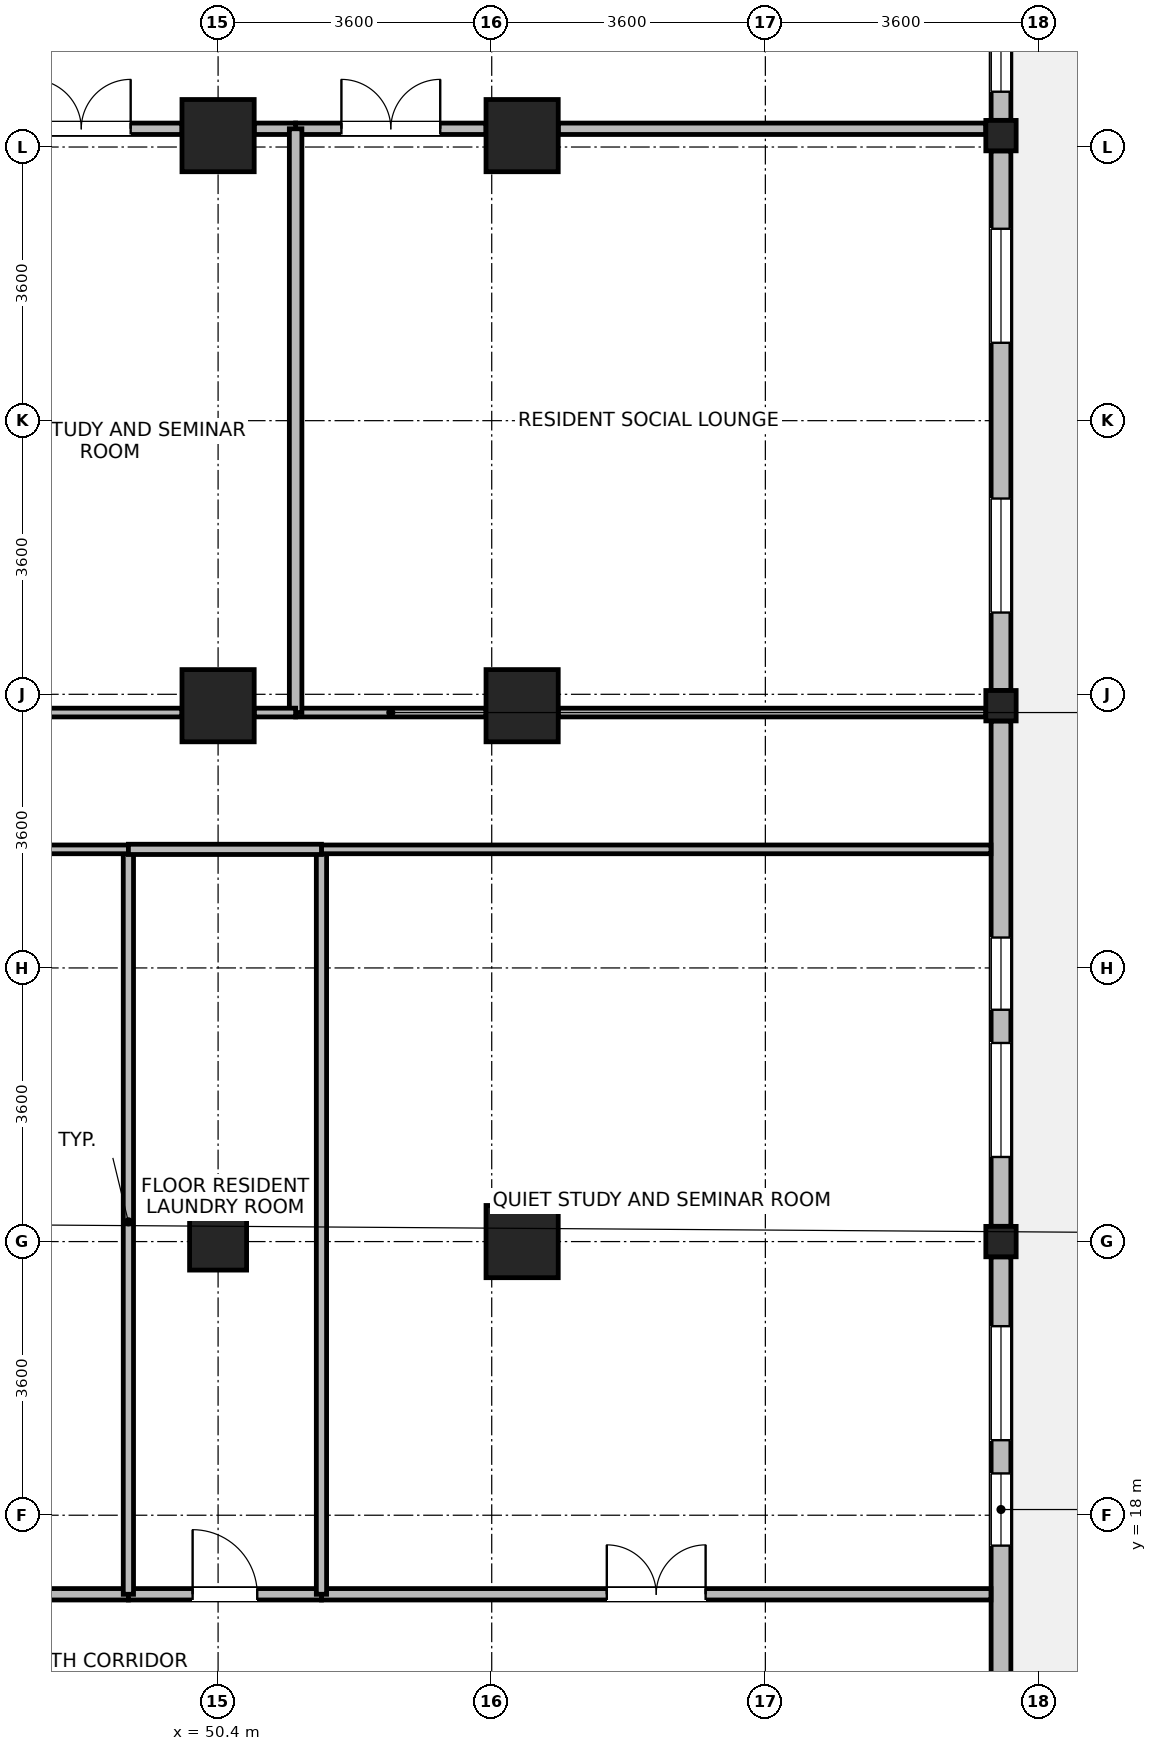
"""IFC4 building model, lengths in metres.
Left out: names, types, materials, properties, quantities, classifications, styles, units other than length and angle.
Written with IfcOpenShell. Run it as: python <this file> out.ifc"""

import sys

from ifc_helpers import new_model, si_unit, direction, frame, frame_2d, origin, origin_2d, place, context, subcontext, project, spatial, rectangle, i_section, extrude, source, transform, mapped, element, fill, save


model = new_model("IFC4")
c1 = context("Model", 3, precision=1e-05, world=origin(), true_north=direction((0.0, 1.0)))
c2 = subcontext(c1, "Body", "Model", "MODEL_VIEW")
j1 = project(units=[si_unit("LENGTHUNIT", "METRE"), si_unit("PLANEANGLEUNIT", "RADIAN")], contexts=[c1])
p1 = place(None, origin())
s1 = spatial("IfcSite", under=j1, at=p1, CompositionType="ELEMENT")
p2 = place(p1, origin())
s2 = spatial("IfcBuilding", under=s1, at=p2, CompositionType="ELEMENT")
p3 = place(p2, frame((0.0, 0.0, 231.4)))
s3 = spatial("IfcBuildingStorey", under=s2, at=p3, CompositionType="ELEMENT", Elevation=231.4)
m1 = source(origin(), c2, "Body", "SweptSolid", [
    extrude(rectangle(XDim=0.75, YDim=0.75, at=origin_2d()), origin(), (0.0, 0.0, 1.0), 3.7),
])
p4 = place(p3, frame((50.4, 21.6, 0.0), z_axis=(0.0, 0.0, 1.0), x_axis=(1.0, 0.0, 0.0)))
e1 = element("IfcColumn", 1, at=p4, inside=s3, PredefinedType="PILASTER", context=c2, shape_type="MappedRepresentation", body=[
    mapped(m1, transform((0.0, 0.0, 0.0), x_axis=(1.0, 0.0, 0.0), y_axis=(0.0, 1.0, 0.0), z_axis=(0.0, 0.0, 1.0), scale=1.0)),
])
m2 = source(origin(), c2, "Body", "SweptSolid", [
    extrude(rectangle(XDim=0.95, YDim=0.95, at=origin_2d()), origin(), (0.0, 0.0, 1.0), 3.7),
])
for number, where, z_axis, x_axis in (
    (2, (50.4, 28.65, 0.0), (0.0, 0.0, 1.0), (1.0, 0.0, 0.0)),
    (3, (50.4, 36.15, 0.0), (0.0, 0.0, 1.0), (1.0, 0.0, 0.0)),
    (4, (54.4, 21.6, 0.0), (0.0, 0.0, 1.0), (1.0, 0.0, 0.0)),
    (5, (54.4, 28.65, 0.0), (0.0, 0.0, 1.0), (1.0, 0.0, 0.0)),
    (6, (54.4, 36.15, 0.0), (0.0, 0.0, 1.0), (1.0, 0.0, 0.0)),
):
    element("IfcColumn", number, at=place(p3, frame(where, z_axis=z_axis, x_axis=x_axis)), inside=s3, PredefinedType="COLUMN", context=c2, shape_type="MappedRepresentation", body=[
        mapped(m2, transform((0.0, 0.0, 0.0), x_axis=(1.0, 0.0, 0.0), y_axis=(0.0, 1.0, 0.0), z_axis=(0.0, 0.0, 1.0), scale=1.0)),
    ])
m3 = source(origin(), c2, "Body", "SweptSolid", [
    extrude(i_section(OverallWidth=0.399, OverallDepth=0.4, WebThickness=0.017, FlangeThickness=0.023, FilletRadius=0.015, at=origin_2d()), origin(), (0.0, 0.0, 1.0), 3.7),
])
for number, where, z_axis, x_axis in (
    (7, (60.7, 21.6, 0.0), (0.0, 0.0, 1.0), (1.0, 0.0, 0.0)),
    (8, (60.7, 28.65, 0.0), (0.0, 0.0, 1.0), (1.0, 0.0, 0.0)),
    (9, (60.7, 36.15, 0.0), (0.0, 0.0, 1.0), (1.0, 0.0, 0.0)),
):
    element("IfcColumn", number, at=place(p3, frame(where, z_axis=z_axis, x_axis=x_axis)), inside=s3, PredefinedType="COLUMN", context=c2, shape_type="MappedRepresentation", body=[
        mapped(m3, transform((0.0, 0.0, 0.0), x_axis=(1.0, 0.0, 0.0), y_axis=(0.0, 1.0, 0.0), z_axis=(0.0, 0.0, 1.0), scale=1.0)),
    ])
p5 = place(p3, frame((60.7, 21.399, 0.0), z_axis=(0.0, 0.0, 1.0), x_axis=(0.0, -1.0, 0.0)))
e10 = element("IfcWall", 10, at=p5, inside=s3, PredefinedType="STANDARD", context=c2, shape_type="SweptSolid", body=[
    extrude(rectangle(XDim=6.648, YDim=0.26, at=frame_2d((3.324, 0.0))), origin(), (0.0, 0.0, 1.0), 3.02),
])
p6 = place(p5, frame((0.912, 0.0, 0.85)))
e11 = element("IfcOpeningElement", 11, at=p6, cuts=e10, PredefinedType="OPENING", context=c2, shape_type="SweptSolid", body=[
    extrude(rectangle(XDim=1.5, YDim=1.85, at=frame_2d((0.75, 0.925))), frame((0.0, 0.14, 0.0), z_axis=(0.0, -1.0, 0.0), x_axis=(1.0, 0.0, 0.0)), (0.0, 0.0, 1.0), 0.28),
])
p7 = place(p5, frame((2.849, 0.0, 0.85)))
e12 = element("IfcOpeningElement", 12, at=p7, cuts=e10, PredefinedType="OPENING", context=c2, shape_type="SweptSolid", body=[
    extrude(rectangle(XDim=0.95, YDim=1.75, at=frame_2d((0.475, 0.875))), frame((0.0, 0.14, 0.0), z_axis=(0.0, -1.0, 0.0), x_axis=(1.0, 0.0, 0.0)), (0.0, 0.0, 1.0), 0.28),
])
p8 = place(p3, frame((60.7, 28.449, 0.0), z_axis=(0.0, 0.0, 1.0), x_axis=(0.0, -1.0, 0.0)))
e13 = element("IfcWall", 13, at=p8, inside=s3, PredefinedType="STANDARD", context=c2, shape_type="SweptSolid", body=[
    extrude(rectangle(XDim=6.648, YDim=0.26, at=frame_2d((3.324, 0.0))), origin(), (0.0, 0.0, 1.0), 3.02),
])
p9 = place(p8, frame((4.236, 0.0, 0.85)))
e14 = element("IfcOpeningElement", 14, at=p9, cuts=e13, PredefinedType="OPENING", context=c2, shape_type="SweptSolid", body=[
    extrude(rectangle(XDim=1.5, YDim=1.85, at=frame_2d((0.75, 0.925))), frame((0.0, 0.14, 0.0), z_axis=(0.0, -1.0, 0.0), x_axis=(1.0, 0.0, 0.0)), (0.0, 0.0, 1.0), 0.28),
])
p10 = place(p8, frame((2.849, 0.0, 0.85)))
e15 = element("IfcOpeningElement", 15, at=p10, cuts=e13, PredefinedType="OPENING", context=c2, shape_type="SweptSolid", body=[
    extrude(rectangle(XDim=0.95, YDim=1.75, at=frame_2d((0.475, 0.875))), frame((0.0, 0.14, 0.0), z_axis=(0.0, -1.0, 0.0), x_axis=(1.0, 0.0, 0.0)), (0.0, 0.0, 1.0), 0.28),
])
p11 = place(p3, frame((60.7, 35.949, 0.0), z_axis=(0.0, 0.0, 1.0), x_axis=(0.0, -1.0, 0.0)))
e16 = element("IfcWall", 16, at=p11, inside=s3, PredefinedType="STANDARD", context=c2, shape_type="SweptSolid", body=[
    extrude(rectangle(XDim=7.098, YDim=0.26, at=frame_2d((3.549, 0.0))), origin(), (0.0, 0.0, 1.0), 3.02),
])
p12 = place(p11, frame((1.024, 0.0, 0.85)))
e17 = element("IfcOpeningElement", 17, at=p12, cuts=e16, PredefinedType="OPENING", context=c2, shape_type="SweptSolid", body=[
    extrude(rectangle(XDim=1.5, YDim=1.85, at=frame_2d((0.75, 0.925))), frame((0.0, 0.14, 0.0), z_axis=(0.0, -1.0, 0.0), x_axis=(1.0, 0.0, 0.0)), (0.0, 0.0, 1.0), 0.28),
])
p13 = place(p11, frame((4.573, 0.0, 0.85)))
e18 = element("IfcOpeningElement", 18, at=p13, cuts=e16, PredefinedType="OPENING", context=c2, shape_type="SweptSolid", body=[
    extrude(rectangle(XDim=1.5, YDim=1.85, at=frame_2d((0.75, 0.925))), frame((0.0, 0.14, 0.0), z_axis=(0.0, -1.0, 0.0), x_axis=(1.0, 0.0, 0.0)), (0.0, 0.0, 1.0), 0.28),
])
p14 = place(p3, frame((60.7, 39.73, 0.0), z_axis=(0.0, 0.0, 1.0), x_axis=(0.0, -1.0, 0.0)))
e19 = element("IfcWall", 19, at=p14, inside=s3, PredefinedType="STANDARD", context=c2, shape_type="SweptSolid", body=[
    extrude(rectangle(XDim=3.379, YDim=0.26, at=frame_2d((1.689, 0.0))), origin(), (0.0, 0.0, 1.0), 3.42),
])
p15 = place(p14, frame((2.052, 0.0, 0.85)))
e20 = element("IfcOpeningElement", 20, at=p15, cuts=e19, PredefinedType="OPENING", context=c2, shape_type="SweptSolid", body=[
    extrude(rectangle(XDim=0.95, YDim=1.75, at=frame_2d((0.475, 0.875))), frame((0.0, 0.14, 0.0), z_axis=(0.0, -1.0, 0.0), x_axis=(1.0, 0.0, 0.0)), (0.0, 0.0, 1.0), 0.28),
])
p16 = place(p14, frame((0.268, 0.0, 0.85)))
e21 = element("IfcOpeningElement", 21, at=p16, cuts=e19, PredefinedType="OPENING", context=c2, shape_type="SweptSolid", body=[
    extrude(rectangle(XDim=0.95, YDim=1.75, at=frame_2d((0.475, 0.875))), frame((0.0, 0.14, 0.0), z_axis=(0.0, -1.0, 0.0), x_axis=(1.0, 0.0, 0.0)), (0.0, 0.0, 1.0), 0.28),
])
p17 = place(p3, frame((51.42, 36.24, 0.0), z_axis=(0.0, 0.0, 1.0), x_axis=(1.0, 0.0, 0.0)))
e22 = element("IfcWall", 22, at=p17, inside=s3, PredefinedType="PARTITIONING", context=c2, shape_type="SweptSolid", body=[
    extrude(rectangle(XDim=2.505, YDim=0.15, at=frame_2d((1.252, 0.0))), origin(), (0.0, 0.0, 1.0), 2.87),
])
p18 = place(p17, frame((0.603, 0.0, 0.0)))
e23 = element("IfcOpeningElement", 23, at=p18, cuts=e22, PredefinedType="OPENING", context=c2, shape_type="SweptSolid", body=[
    extrude(rectangle(XDim=1.3, YDim=2.12, at=frame_2d((0.65, 1.06))), frame((0.0, 0.085, 0.0), z_axis=(0.0, -1.0, 0.0), x_axis=(1.0, 0.0, 0.0)), (0.0, 0.0, 1.0), 0.17),
])
p19 = place(p3, frame((54.875, 36.24, 0.0), z_axis=(0.0, 0.0, 1.0), x_axis=(1.0, 0.0, 0.0)))
e24 = element("IfcWall", 24, at=p19, inside=s3, PredefinedType="PARTITIONING", context=c2, shape_type="SweptSolid", body=[
    extrude(rectangle(XDim=5.625, YDim=0.15, at=frame_2d((2.813, 0.0))), origin(), (0.0, 0.0, 1.0), 2.87),
])
p20 = place(p3, frame((51.76, 16.96, 0.0), z_axis=(0.0, 0.0, 1.0), x_axis=(1.0, 0.0, 0.0)))
e25 = element("IfcWall", 25, at=p20, inside=s3, PredefinedType="PARTITIONING", context=c2, shape_type="SweptSolid", body=[
    extrude(rectangle(XDim=8.808, YDim=0.15, at=frame_2d((4.404, 0.0))), origin(), (0.0, 0.0, 1.0), 3.42),
])
p21 = place(p20, frame((3.754, 0.0, 0.0)))
e26 = element("IfcOpeningElement", 26, at=p21, cuts=e25, PredefinedType="OPENING", context=c2, shape_type="SweptSolid", body=[
    extrude(rectangle(XDim=1.3, YDim=2.12, at=frame_2d((0.65, 1.06))), frame((0.0, 0.085, 0.0), z_axis=(0.0, -1.0, 0.0), x_axis=(1.0, 0.0, 0.0)), (0.0, 0.0, 1.0), 0.17),
])
p22 = place(p3, frame((42.02, 16.96, 0.0), z_axis=(0.0, 0.0, 1.0), x_axis=(1.0, 0.0, 0.0)))
e27 = element("IfcWall", 27, at=p22, inside=s3, PredefinedType="PARTITIONING", context=c2, shape_type="SweptSolid", body=[
    extrude(rectangle(XDim=7.2, YDim=0.15, at=frame_2d((3.6, 0.0))), origin(), (0.0, 0.0, 1.0), 3.42),
])
p23 = place(p22, frame((2.95, 0.0, 0.0)))
e28 = element("IfcOpeningElement", 28, at=p23, cuts=e27, PredefinedType="OPENING", context=c2, shape_type="SweptSolid", body=[
    extrude(rectangle(XDim=1.3, YDim=2.12, at=frame_2d((0.65, 1.06))), frame((0.0, 0.085, 0.0), z_axis=(0.0, -1.0, 0.0), x_axis=(1.0, 0.0, 0.0)), (0.0, 0.0, 1.0), 0.17),
])
p24 = place(p3, frame((47.275, 36.24, 0.0), z_axis=(0.0, 0.0, 1.0), x_axis=(1.0, 0.0, 0.0)))
e29 = element("IfcWall", 29, at=p24, inside=s3, PredefinedType="PARTITIONING", context=c2, shape_type="SweptSolid", body=[
    extrude(rectangle(XDim=2.65, YDim=0.15, at=frame_2d((1.325, 0.0))), origin(), (0.0, 0.0, 1.0), 2.87),
])
p25 = place(p24, frame((0.675, 0.0, 0.0)))
e30 = element("IfcOpeningElement", 30, at=p25, cuts=e29, PredefinedType="OPENING", context=c2, shape_type="SweptSolid", body=[
    extrude(rectangle(XDim=1.3, YDim=2.12, at=frame_2d((0.65, 1.06))), frame((0.0, 0.085, 0.0), z_axis=(0.0, -1.0, 0.0), x_axis=(1.0, 0.0, 0.0)), (0.0, 0.0, 1.0), 0.17),
])
p26 = place(p3, frame((50.875, 36.24, 0.0), z_axis=(0.0, 0.0, 1.0), x_axis=(1.0, 0.0, 0.0)))
e31 = element("IfcWall", 31, at=p26, inside=s3, PredefinedType="PARTITIONING", context=c2, shape_type="SweptSolid", body=[
    extrude(rectangle(XDim=0.545, YDim=0.15, at=frame_2d((0.272, 0.0))), origin(), (0.0, 0.0, 1.0), 2.87),
])
p27 = place(p3, frame((49.22, 16.96, 0.0), z_axis=(0.0, 0.0, 1.0), x_axis=(1.0, 0.0, 0.0)))
e32 = element("IfcWall", 32, at=p27, inside=s3, PredefinedType="PARTITIONING", context=c2, shape_type="SweptSolid", body=[
    extrude(rectangle(XDim=2.54, YDim=0.15, at=frame_2d((1.27, 0.0))), origin(), (0.0, 0.0, 1.0), 3.42),
])
p28 = place(p27, frame((0.845, 0.0, 0.0)))
e33 = element("IfcOpeningElement", 33, at=p28, cuts=e32, PredefinedType="OPENING", context=c2, shape_type="SweptSolid", body=[
    extrude(rectangle(XDim=0.85, YDim=2.04, at=frame_2d((0.425, 1.02))), frame((0.0, 0.085, 0.0), z_axis=(0.0, -1.0, 0.0), x_axis=(1.0, 0.0, 0.0)), (0.0, 0.0, 1.0), 0.17),
])
for number, where, z_axis, x_axis in (
    (34, (49.22, 16.96, 0.0), (0.0, 0.0, 1.0), (0.0, 1.0, 0.0)),
    (35, (51.76, 16.96, 0.0), (0.0, 0.0, 1.0), (0.0, 1.0, 0.0)),
):
    element("IfcWall", number, at=place(p3, frame(where, z_axis=z_axis, x_axis=x_axis)), inside=s3, PredefinedType="PARTITIONING", context=c2, shape_type="SweptSolid", body=[
        extrude(rectangle(XDim=9.8, YDim=0.135, at=frame_2d((4.9, 0.0))), origin(), (0.0, 0.0, 1.0), 3.42),
    ])
p29 = place(p3, frame((51.42, 28.56, 0.0), z_axis=(0.0, 0.0, 1.0), x_axis=(1.0, 0.0, 0.0)))
e36 = element("IfcWall", 36, at=p29, inside=s3, PredefinedType="PARTITIONING", context=c2, shape_type="SweptSolid", body=[
    extrude(rectangle(XDim=2.505, YDim=0.115, at=frame_2d((1.252, 0.0))), origin(), (0.0, 0.0, 1.0), 2.87),
])
p30 = place(p3, frame((54.875, 28.56, 0.0), z_axis=(0.0, 0.0, 1.0), x_axis=(1.0, 0.0, 0.0)))
e37 = element("IfcWall", 37, at=p30, inside=s3, PredefinedType="PARTITIONING", context=c2, shape_type="SweptSolid", body=[
    extrude(rectangle(XDim=5.625, YDim=0.115, at=frame_2d((2.813, 0.0))), origin(), (0.0, 0.0, 1.0), 2.87),
])
p31 = place(p3, frame((51.76, 26.76, 0.0), z_axis=(0.0, 0.0, 1.0), x_axis=(1.0, 0.0, 0.0)))
e38 = element("IfcWall", 38, at=p31, inside=s3, PredefinedType="PARTITIONING", context=c2, shape_type="SweptSolid", body=[
    extrude(rectangle(XDim=8.808, YDim=0.115, at=frame_2d((4.404, 0.0))), origin(), (0.0, 0.0, 1.0), 3.42),
])
p32 = place(p3, frame((51.42, 28.56, 0.0), z_axis=(0.0, 0.0, 1.0), x_axis=(0.0, 1.0, 0.0)))
e39 = element("IfcWall", 39, at=p32, inside=s3, PredefinedType="PARTITIONING", context=c2, shape_type="SweptSolid", body=[
    extrude(rectangle(XDim=7.68, YDim=0.165, at=frame_2d((3.84, 0.0))), origin(), (0.0, 0.0, 1.0), 3.42),
])
p33 = place(p3, frame((42.02, 26.76, 0.0), z_axis=(0.0, 0.0, 1.0), x_axis=(1.0, 0.0, 0.0)))
e40 = element("IfcWall", 40, at=p33, inside=s3, PredefinedType="PARTITIONING", context=c2, shape_type="SweptSolid", body=[
    extrude(rectangle(XDim=7.2, YDim=0.115, at=frame_2d((3.6, 0.0))), origin(), (0.0, 0.0, 1.0), 3.42),
])
p34 = place(p3, frame((47.275, 28.56, 0.0), z_axis=(0.0, 0.0, 1.0), x_axis=(1.0, 0.0, 0.0)))
e41 = element("IfcWall", 41, at=p34, inside=s3, PredefinedType="PARTITIONING", context=c2, shape_type="SweptSolid", body=[
    extrude(rectangle(XDim=2.65, YDim=0.115, at=frame_2d((1.325, 0.0))), origin(), (0.0, 0.0, 1.0), 2.87),
])
p35 = place(p3, frame((50.875, 28.56, 0.0), z_axis=(0.0, 0.0, 1.0), x_axis=(1.0, 0.0, 0.0)))
e42 = element("IfcWall", 42, at=p35, inside=s3, PredefinedType="PARTITIONING", context=c2, shape_type="SweptSolid", body=[
    extrude(rectangle(XDim=0.545, YDim=0.115, at=frame_2d((0.272, 0.0))), origin(), (0.0, 0.0, 1.0), 2.87),
])
p36 = place(p3, frame((49.22, 26.76, 0.0), z_axis=(0.0, 0.0, 1.0), x_axis=(1.0, 0.0, 0.0)))
e43 = element("IfcWall", 43, at=p36, inside=s3, PredefinedType="PARTITIONING", context=c2, shape_type="SweptSolid", body=[
    extrude(rectangle(XDim=2.54, YDim=0.135, at=frame_2d((1.27, 0.0))), origin(), (0.0, 0.0, 1.0), 3.42),
])
p37 = place(p6, origin())
e44 = element("IfcWindow", 44, at=p37, inside=s3, PartitioningType="SINGLE_PANEL", PredefinedType="WINDOW", context=c2, shape_type="SweptSolid", body=[
    extrude(rectangle(XDim=1.5, YDim=1.85, at=frame_2d((0.75, 0.925))), frame((0.0, 0.03, 0.0), z_axis=(0.0, -1.0, 0.0), x_axis=(1.0, 0.0, 0.0)), (0.0, 0.0, 1.0), 0.06),
])
fill(e11, e44)
p38 = place(p7, origin())
e45 = element("IfcWindow", 45, at=p38, inside=s3, PartitioningType="SINGLE_PANEL", PredefinedType="WINDOW", context=c2, shape_type="SweptSolid", body=[
    extrude(rectangle(XDim=0.95, YDim=1.75, at=frame_2d((0.475, 0.875))), frame((0.0, 0.03, 0.0), z_axis=(0.0, -1.0, 0.0), x_axis=(1.0, 0.0, 0.0)), (0.0, 0.0, 1.0), 0.06),
])
fill(e12, e45)
p39 = place(p9, origin())
e46 = element("IfcWindow", 46, at=p39, inside=s3, PartitioningType="SINGLE_PANEL", PredefinedType="WINDOW", context=c2, shape_type="SweptSolid", body=[
    extrude(rectangle(XDim=1.5, YDim=1.85, at=frame_2d((0.75, 0.925))), frame((0.0, 0.03, 0.0), z_axis=(0.0, -1.0, 0.0), x_axis=(1.0, 0.0, 0.0)), (0.0, 0.0, 1.0), 0.06),
])
fill(e14, e46)
p40 = place(p10, origin())
e47 = element("IfcWindow", 47, at=p40, inside=s3, PartitioningType="SINGLE_PANEL", PredefinedType="WINDOW", context=c2, shape_type="SweptSolid", body=[
    extrude(rectangle(XDim=0.95, YDim=1.75, at=frame_2d((0.475, 0.875))), frame((0.0, 0.03, 0.0), z_axis=(0.0, -1.0, 0.0), x_axis=(1.0, 0.0, 0.0)), (0.0, 0.0, 1.0), 0.06),
])
fill(e15, e47)
p41 = place(p12, origin())
e48 = element("IfcWindow", 48, at=p41, inside=s3, PartitioningType="SINGLE_PANEL", PredefinedType="WINDOW", context=c2, shape_type="SweptSolid", body=[
    extrude(rectangle(XDim=1.5, YDim=1.85, at=frame_2d((0.75, 0.925))), frame((0.0, 0.03, 0.0), z_axis=(0.0, -1.0, 0.0), x_axis=(1.0, 0.0, 0.0)), (0.0, 0.0, 1.0), 0.06),
])
fill(e17, e48)
p42 = place(p13, origin())
e49 = element("IfcWindow", 49, at=p42, inside=s3, PartitioningType="SINGLE_PANEL", PredefinedType="WINDOW", context=c2, shape_type="SweptSolid", body=[
    extrude(rectangle(XDim=1.5, YDim=1.85, at=frame_2d((0.75, 0.925))), frame((0.0, 0.03, 0.0), z_axis=(0.0, -1.0, 0.0), x_axis=(1.0, 0.0, 0.0)), (0.0, 0.0, 1.0), 0.06),
])
fill(e18, e49)
p43 = place(p15, origin())
e50 = element("IfcWindow", 50, at=p43, inside=s3, PartitioningType="SINGLE_PANEL", PredefinedType="WINDOW", context=c2, shape_type="SweptSolid", body=[
    extrude(rectangle(XDim=0.95, YDim=1.75, at=frame_2d((0.475, 0.875))), frame((0.0, 0.03, 0.0), z_axis=(0.0, -1.0, 0.0), x_axis=(1.0, 0.0, 0.0)), (0.0, 0.0, 1.0), 0.06),
])
fill(e20, e50)
p44 = place(p18, origin())
e51 = element("IfcDoor", 51, at=p44, inside=s3, OperationType="DOUBLE_DOOR_SINGLE_SWING", PredefinedType="DOOR", context=c2, shape_type="SweptSolid", body=[
    extrude(rectangle(XDim=1.3, YDim=2.12, at=frame_2d((0.65, 1.06))), frame((0.0, 0.025, 0.0), z_axis=(0.0, -1.0, 0.0), x_axis=(1.0, 0.0, 0.0)), (0.0, 0.0, 1.0), 0.05),
])
fill(e23, e51)
p45 = place(p21, origin())
e52 = element("IfcDoor", 52, at=p45, inside=s3, OperationType="DOUBLE_DOOR_SINGLE_SWING", PredefinedType="DOOR", context=c2, shape_type="SweptSolid", body=[
    extrude(rectangle(XDim=1.3, YDim=2.12, at=frame_2d((0.65, 1.06))), frame((0.0, 0.025, 0.0), z_axis=(0.0, -1.0, 0.0), x_axis=(1.0, 0.0, 0.0)), (0.0, 0.0, 1.0), 0.05),
])
fill(e26, e52)
p46 = place(p25, origin())
e53 = element("IfcDoor", 53, at=p46, inside=s3, OperationType="DOUBLE_DOOR_SINGLE_SWING", PredefinedType="DOOR", context=c2, shape_type="SweptSolid", body=[
    extrude(rectangle(XDim=1.3, YDim=2.12, at=frame_2d((0.65, 1.06))), frame((0.0, 0.025, 0.0), z_axis=(0.0, -1.0, 0.0), x_axis=(1.0, 0.0, 0.0)), (0.0, 0.0, 1.0), 0.05),
])
fill(e30, e53)
p47 = place(p28, origin())
e54 = element("IfcDoor", 54, at=p47, inside=s3, OperationType="SINGLE_SWING_LEFT", PredefinedType="DOOR", context=c2, shape_type="SweptSolid", body=[
    extrude(rectangle(XDim=0.85, YDim=2.04, at=frame_2d((0.425, 1.02))), frame((0.0, 0.025, 0.0), z_axis=(0.0, -1.0, 0.0), x_axis=(1.0, 0.0, 0.0)), (0.0, 0.0, 1.0), 0.05),
])
fill(e33, e54)
save(model, sys.argv[1])
